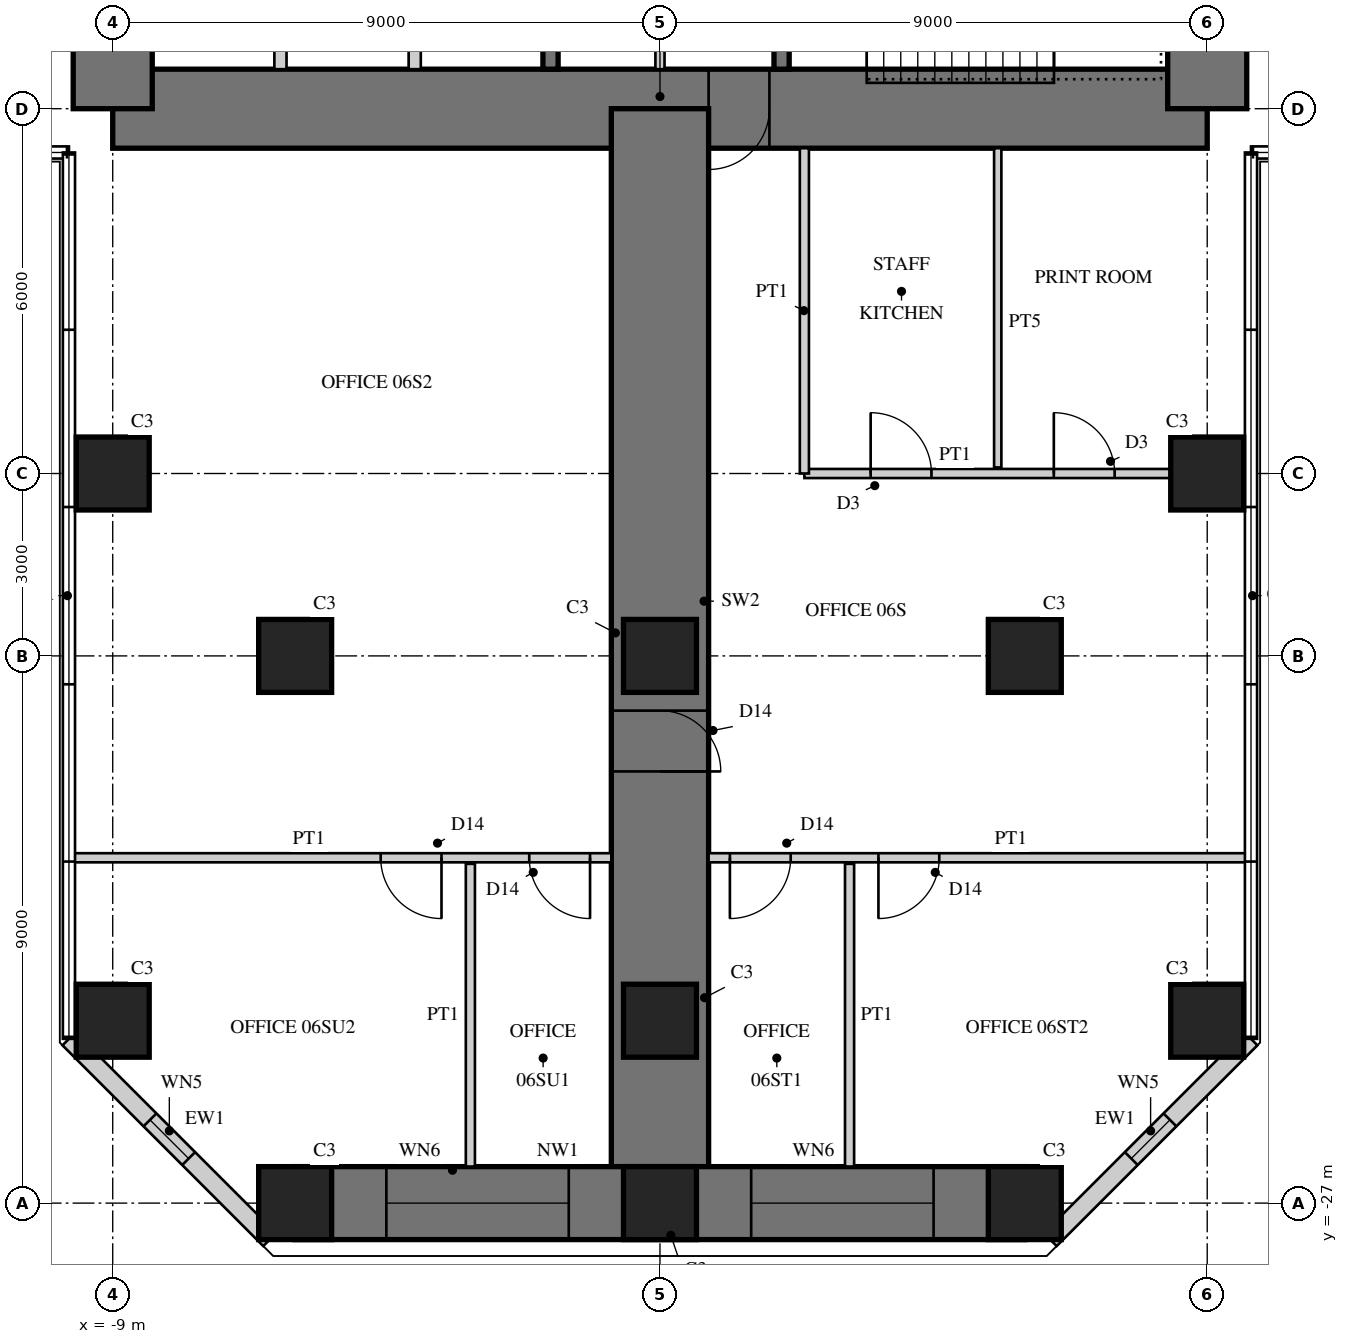
"""IFC4 building model, lengths in metres.
Left out: names, types, materials, properties, quantities, classifications, styles, units other than length and angle.
Written with IfcOpenShell. Run it as: python <this file> out.ifc"""

import sys

from ifc_helpers import new_model, si_unit, direction, frame, frame_2d, origin, origin_2d, place, context, subcontext, project, spatial, rectangle, hollow_rectangle, extrude, element, fill, save


model = new_model("IFC4")
c1 = context("Model", 3, precision=1e-05, world=origin(), true_north=direction((0.0, 1.0)))
c2 = subcontext(c1, "Body", "Model", "MODEL_VIEW")
j1 = project(units=[si_unit("LENGTHUNIT", "METRE"), si_unit("PLANEANGLEUNIT", "RADIAN")], contexts=[c1])
p1 = place(None, origin())
s1 = spatial("IfcSite", under=j1, at=p1, CompositionType="ELEMENT")
p2 = place(p1, origin())
s2 = spatial("IfcBuilding", under=s1, at=p2, CompositionType="ELEMENT")
p3 = place(p2, frame((0.0, 0.0, 27.5)))
s3 = spatial("IfcBuildingStorey", under=s2, at=p3, CompositionType="ELEMENT", Elevation=27.5)
p4 = place(p3, frame((-9.0, -9.0, 0.0), z_axis=(0.0, 0.0, 1.0), x_axis=(1.0, 0.0, 0.0)))
e1 = element("IfcWall", 1, at=p4, inside=s3, PredefinedType="SHEAR", context=c2, shape_type="SweptSolid", body=[
    extrude(rectangle(XDim=18.0, YDim=1.3, at=frame_2d((9.0, 0.0))), origin(), (0.0, 0.0, 1.0), 4.0),
])
p5 = place(p4, frame((9.8, 0.0, 0.0)))
e2 = element("IfcOpeningElement", 2, at=p5, cuts=e1, PredefinedType="OPENING", context=c2, shape_type="SweptSolid", body=[
    extrude(rectangle(XDim=1.0, YDim=2.4, at=frame_2d((0.5, 1.2))), frame((0.0, 0.66, 0.0), z_axis=(0.0, -1.0, 0.0), x_axis=(1.0, 0.0, 0.0)), (0.0, 0.0, 1.0), 1.32),
])
p6 = place(p3, frame((9.0, -9.0, 0.0), z_axis=(0.0, 0.0, 1.0), x_axis=(0.0, 1.0, 0.0)))
e3 = element("IfcWall", 3, at=p6, inside=s3, PredefinedType="SHEAR", context=c2, shape_type="SweptSolid", body=[
    extrude(rectangle(XDim=18.0, YDim=1.3, at=frame_2d((9.0, 0.0))), origin(), (0.0, 0.0, 1.0), 4.0),
])
p7 = place(p6, frame((9.8, 0.0, 0.0)))
e4 = element("IfcOpeningElement", 4, at=p7, cuts=e3, PredefinedType="OPENING", context=c2, shape_type="SweptSolid", body=[
    extrude(rectangle(XDim=1.0, YDim=2.4, at=frame_2d((0.5, 1.2))), frame((0.0, 0.66, 0.0), z_axis=(0.0, -1.0, 0.0), x_axis=(1.0, 0.0, 0.0)), (0.0, 0.0, 1.0), 1.32),
])
p8 = place(p3, frame((-9.0, 9.0, 0.0), z_axis=(0.0, 0.0, 1.0), x_axis=(0.0, -1.0, 0.0)))
e5 = element("IfcWall", 5, at=p8, inside=s3, PredefinedType="SHEAR", context=c2, shape_type="SweptSolid", body=[
    extrude(rectangle(XDim=18.0, YDim=1.3, at=frame_2d((9.0, 0.0))), origin(), (0.0, 0.0, 1.0), 4.0),
])
p9 = place(p8, frame((9.8, 0.0, 0.0)))
e6 = element("IfcOpeningElement", 6, at=p9, cuts=e5, PredefinedType="OPENING", context=c2, shape_type="SweptSolid", body=[
    extrude(rectangle(XDim=1.0, YDim=2.4, at=frame_2d((0.5, 1.2))), frame((0.0, 0.66, 0.0), z_axis=(0.0, -1.0, 0.0), x_axis=(1.0, 0.0, 0.0)), (0.0, 0.0, 1.0), 1.32),
])
p10 = place(p3, frame((-1.8, -1.875, 0.0), z_axis=(0.0, 0.0, 1.0), x_axis=(0.0, -1.0, 0.0)))
e7 = element("IfcWall", 7, at=p10, inside=s3, PredefinedType="SHEAR", context=c2, shape_type="SweptSolid", body=[
    extrude(rectangle(XDim=6.475, YDim=0.25, at=frame_2d((3.238, 0.0))), origin(), (0.0, 0.0, 1.0), 4.0),
])
p11 = place(p10, frame((1.875, 0.0, 0.0)))
e8 = element("IfcOpeningElement", 8, at=p11, cuts=e7, PredefinedType="OPENING", context=c2, shape_type="SweptSolid", body=[
    extrude(rectangle(XDim=1.6, YDim=2.4, at=frame_2d((0.8, 1.2))), frame((0.0, 0.135, 0.0), z_axis=(0.0, -1.0, 0.0), x_axis=(1.0, 0.0, 0.0)), (0.0, 0.0, 1.0), 0.27),
])
for number, where, z_axis, x_axis in (
    (9, (-4.033, -5.975, 0.0), (0.0, 0.0, 1.0), (0.0, -1.0, 0.0)),
    (10, (-6.242, -5.975, 0.0), (0.0, 0.0, 1.0), (0.0, -1.0, 0.0)),
):
    element("IfcWall", number, at=place(p3, frame(where, z_axis=z_axis, x_axis=x_axis)), inside=s3, PredefinedType="PARTITIONING", context=c2, shape_type="SweptSolid", body=[
        extrude(rectangle(XDim=2.375, YDim=0.2, at=frame_2d((1.188, 0.0))), origin(), (0.0, 0.0, 1.0), 4.0),
    ])
p12 = place(p3, frame((2.0, -1.675, 0.0), z_axis=(0.0, 0.0, 1.0), x_axis=(0.0, -1.0, 0.0)))
e11 = element("IfcWall", 11, at=p12, inside=s3, PredefinedType="SHEAR", context=c2, shape_type="SweptSolid", body=[
    extrude(rectangle(XDim=6.675, YDim=0.25, at=frame_2d((3.337, 0.0))), origin(), (0.0, 0.0, 1.0), 4.0),
])
p13 = place(p12, frame((0.725, 0.0, 0.0)))
e12 = element("IfcOpeningElement", 12, at=p13, cuts=e11, PredefinedType="OPENING", context=c2, shape_type="SweptSolid", body=[
    extrude(rectangle(XDim=1.0, YDim=2.1, at=frame_2d((0.5, 1.05))), frame((0.0, 0.135, 0.0), z_axis=(0.0, -1.0, 0.0), x_axis=(1.0, 0.0, 0.0)), (0.0, 0.0, 1.0), 0.27),
])
p14 = place(p3, frame((0.0, -9.0, 0.0), z_axis=(0.0, 0.0, 1.0), x_axis=(0.0, -1.0, 0.0)))
e13 = element("IfcWall", 13, at=p14, inside=s3, PredefinedType="SHEAR", context=c2, shape_type="SweptSolid", body=[
    extrude(rectangle(XDim=18.0, YDim=1.6, at=frame_2d((9.0, 0.0))), origin(), (0.0, 0.0, 1.0), 4.0),
])
p15 = place(p14, frame((9.9, 0.0, 0.0)))
e14 = element("IfcOpeningElement", 14, at=p15, cuts=e13, PredefinedType="OPENING", context=c2, shape_type="SweptSolid", body=[
    extrude(rectangle(XDim=1.0, YDim=2.2, at=frame_2d((0.5, 1.1))), frame((0.0, 0.81, 0.0), z_axis=(0.0, -1.0, 0.0), x_axis=(1.0, 0.0, 0.0)), (0.0, 0.0, 1.0), 1.62),
])
p16 = place(p3, frame((-6.0, -27.0, 0.0), z_axis=(0.0, 0.0, 1.0), x_axis=(1.0, 0.0, 0.0)))
e15 = element("IfcWall", 15, at=p16, inside=s3, PredefinedType="SHEAR", context=c2, shape_type="SweptSolid", body=[
    extrude(rectangle(XDim=12.0, YDim=1.2, at=frame_2d((6.0, 0.0))), origin(), (0.0, 0.0, 1.0), 4.0),
])
p17 = place(p16, frame((1.5, 0.0, 0.6)))
e16 = element("IfcOpeningElement", 16, at=p17, cuts=e15, PredefinedType="OPENING", context=c2, shape_type="SweptSolid", body=[
    extrude(rectangle(XDim=3.0, YDim=2.4, at=frame_2d((1.5, 1.2))), frame((0.0, 0.61, 0.0), z_axis=(0.0, -1.0, 0.0), x_axis=(1.0, 0.0, 0.0)), (0.0, 0.0, 1.0), 1.22),
])
p18 = place(p16, frame((7.5, 0.0, 0.6)))
e17 = element("IfcOpeningElement", 17, at=p18, cuts=e15, PredefinedType="OPENING", context=c2, shape_type="SweptSolid", body=[
    extrude(rectangle(XDim=3.0, YDim=2.4, at=frame_2d((1.5, 1.2))), frame((0.0, 0.61, 0.0), z_axis=(0.0, -1.0, 0.0), x_axis=(1.0, 0.0, 0.0)), (0.0, 0.0, 1.0), 1.22),
])
for number, where, z_axis, x_axis in (
    (18, (-9.0, -15.0, 0.0), (0.0, 0.0, 1.0), (1.0, 0.0, 0.0)),
    (19, (-9.0, -24.0, 0.0), (0.0, 0.0, 1.0), (1.0, 0.0, 0.0)),
    (20, (9.0, -15.0, 0.0), (0.0, 0.0, 1.0), (1.0, 0.0, 0.0)),
    (21, (9.0, -24.0, 0.0), (0.0, 0.0, 1.0), (1.0, 0.0, 0.0)),
    (22, (-6.0, -27.0, 0.0), (0.0, 0.0, 1.0), (1.0, 0.0, 0.0)),
    (23, (0.0, -27.0, 0.0), (0.0, 0.0, 1.0), (1.0, 0.0, 0.0)),
    (24, (6.0, -27.0, 0.0), (0.0, 0.0, 1.0), (1.0, 0.0, 0.0)),
    (25, (-6.0, -18.0, 0.0), (0.0, 0.0, 1.0), (1.0, 0.0, 0.0)),
    (26, (0.0, -18.0, 0.0), (0.0, 0.0, 1.0), (1.0, 0.0, 0.0)),
    (27, (6.0, -18.0, 0.0), (0.0, 0.0, 1.0), (1.0, 0.0, 0.0)),
    (28, (0.0, -24.0, 0.0), (0.0, 0.0, 1.0), (1.0, 0.0, 0.0)),
):
    element("IfcColumn", number, at=place(p3, frame(where, z_axis=z_axis, x_axis=x_axis)), inside=s3, PredefinedType="COLUMN", context=c2, shape_type="SweptSolid", body=[
        extrude(rectangle(XDim=1.2, YDim=1.2, at=origin_2d()), origin(), (0.0, 0.0, 1.0), 4.0),
    ])
p19 = place(p3, frame((-9.72, -24.298, 0.0), z_axis=(0.0, 0.0, 1.0), x_axis=(0.707106781187, -0.707106781187, 0.0)))
e29 = element("IfcWall", 29, at=p19, inside=s3, PredefinedType="SOLIDWALL", context=c2, shape_type="SweptSolid", body=[
    extrude(rectangle(XDim=4.669, YDim=0.3, at=frame_2d((2.335, 0.0))), origin(), (0.0, 0.0, 1.0), 3.8),
])
p20 = place(p19, frame((1.885, 0.0, 0.3)))
e30 = element("IfcOpeningElement", 30, at=p20, cuts=e29, PredefinedType="OPENING", context=c2, shape_type="SweptSolid", body=[
    extrude(rectangle(XDim=0.9, YDim=2.4, at=frame_2d((0.45, 1.2))), frame((0.0, 0.16, 0.0), z_axis=(0.0, -1.0, 0.0), x_axis=(1.0, 0.0, 0.0)), (0.0, 0.0, 1.0), 0.32),
])
p21 = place(p3, frame((6.418, -27.6, 0.0), z_axis=(0.0, 0.0, 1.0), x_axis=(0.707106781187, 0.707106781187, 0.0)))
e31 = element("IfcWall", 31, at=p21, inside=s3, PredefinedType="SOLIDWALL", context=c2, shape_type="SweptSolid", body=[
    extrude(rectangle(XDim=4.669, YDim=0.3, at=frame_2d((2.335, 0.0))), origin(), (0.0, 0.0, 1.0), 3.8),
])
p22 = place(p21, frame((1.885, 0.0, 0.3)))
e32 = element("IfcOpeningElement", 32, at=p22, cuts=e31, PredefinedType="OPENING", context=c2, shape_type="SweptSolid", body=[
    extrude(rectangle(XDim=0.9, YDim=2.4, at=frame_2d((0.45, 1.2))), frame((0.0, 0.16, 0.0), z_axis=(0.0, -1.0, 0.0), x_axis=(1.0, 0.0, 0.0)), (0.0, 0.0, 1.0), 0.32),
])
p23 = place(p3, frame((0.0, -5.675, 0.0), z_axis=(0.0, 0.0, 1.0), x_axis=(0.0, -1.0, 0.0)))
e33 = element("IfcWall", 33, at=p23, inside=s3, PredefinedType="PARTITIONING", context=c2, shape_type="SweptSolid", body=[
    extrude(rectangle(XDim=2.675, YDim=0.15, at=frame_2d((1.337, 0.0))), origin(), (0.0, 0.0, 1.0), 3.8),
])
p24 = place(p23, frame((0.4, 0.0, 0.0)))
e34 = element("IfcOpeningElement", 34, at=p24, cuts=e33, PredefinedType="OPENING", context=c2, shape_type="SweptSolid", body=[
    extrude(rectangle(XDim=1.0, YDim=2.1, at=frame_2d((0.5, 1.05))), frame((0.0, 0.085, 0.0), z_axis=(0.0, -1.0, 0.0), x_axis=(1.0, 0.0, 0.0)), (0.0, 0.0, 1.0), 0.17),
])
p25 = place(p3, frame((2.375, -15.0, 0.0), z_axis=(0.0, 0.0, 1.0), x_axis=(1.0, 0.0, 0.0)))
e35 = element("IfcWall", 35, at=p25, inside=s3, PredefinedType="PARTITIONING", context=c2, shape_type="SweptSolid", body=[
    extrude(rectangle(XDim=6.025, YDim=0.15, at=frame_2d((3.012, 0.0))), origin(), (0.0, 0.0, 1.0), 2.95),
])
p26 = place(p25, frame((1.09, 0.0, 0.0)))
e36 = element("IfcOpeningElement", 36, at=p26, cuts=e35, PredefinedType="OPENING", context=c2, shape_type="SweptSolid", body=[
    extrude(rectangle(XDim=1.0, YDim=2.1, at=frame_2d((0.5, 1.05))), frame((0.0, 0.085, 0.0), z_axis=(0.0, -1.0, 0.0), x_axis=(1.0, 0.0, 0.0)), (0.0, 0.0, 1.0), 0.17),
])
p27 = place(p25, frame((4.102, 0.0, 0.0)))
e37 = element("IfcOpeningElement", 37, at=p27, cuts=e35, PredefinedType="OPENING", context=c2, shape_type="SweptSolid", body=[
    extrude(rectangle(XDim=1.0, YDim=2.1, at=frame_2d((0.5, 1.05))), frame((0.0, 0.085, 0.0), z_axis=(0.0, -1.0, 0.0), x_axis=(1.0, 0.0, 0.0)), (0.0, 0.0, 1.0), 0.17),
])
p28 = place(p3, frame((2.375, -9.65, 0.0), z_axis=(0.0, 0.0, 1.0), x_axis=(0.0, -1.0, 0.0)))
e38 = element("IfcWall", 38, at=p28, inside=s3, PredefinedType="PARTITIONING", context=c2, shape_type="SweptSolid", body=[
    extrude(rectangle(XDim=5.35, YDim=0.15, at=frame_2d((2.675, 0.0))), origin(), (0.0, 0.0, 1.0), 3.8),
])
p29 = place(p3, frame((5.555, -9.65, 0.0), z_axis=(0.0, 0.0, 1.0), x_axis=(0.0, -1.0, 0.0)))
e39 = element("IfcWall", 39, at=p29, inside=s3, PredefinedType="PLUMBINGWALL", context=c2, shape_type="SweptSolid", body=[
    extrude(rectangle(XDim=5.25, YDim=0.12, at=frame_2d((2.625, 0.0))), origin(), (0.0, 0.0, 1.0), 3.8),
])
p30 = place(p3, frame((3.118, -21.42, 0.0), z_axis=(0.0, 0.0, 1.0), x_axis=(0.0, -1.0, 0.0)))
e40 = element("IfcWall", 40, at=p30, inside=s3, PredefinedType="PARTITIONING", context=c2, shape_type="SweptSolid", body=[
    extrude(rectangle(XDim=4.98, YDim=0.15, at=frame_2d((2.49, 0.0))), origin(), (0.0, 0.0, 1.0), 3.8),
])
p31 = place(p3, frame((0.8, -21.32, 0.0), z_axis=(0.0, 0.0, 1.0), x_axis=(1.0, 0.0, 0.0)))
e41 = element("IfcWall", 41, at=p31, inside=s3, PredefinedType="PARTITIONING", context=c2, shape_type="SweptSolid", body=[
    extrude(rectangle(XDim=8.88, YDim=0.15, at=frame_2d((4.44, 0.0))), origin(), (0.0, 0.0, 1.0), 3.8),
])
p32 = place(p31, frame((0.35, 0.0, 0.0)))
e42 = element("IfcOpeningElement", 42, at=p32, cuts=e41, PredefinedType="OPENING", context=c2, shape_type="SweptSolid", body=[
    extrude(rectangle(XDim=1.0, YDim=2.2, at=frame_2d((0.5, 1.1))), frame((0.0, 0.085, 0.0), z_axis=(0.0, -1.0, 0.0), x_axis=(1.0, 0.0, 0.0)), (0.0, 0.0, 1.0), 0.17),
])
p33 = place(p31, frame((2.793, 0.0, 0.0)))
e43 = element("IfcOpeningElement", 43, at=p33, cuts=e41, PredefinedType="OPENING", context=c2, shape_type="SweptSolid", body=[
    extrude(rectangle(XDim=1.0, YDim=2.2, at=frame_2d((0.5, 1.1))), frame((0.0, 0.085, 0.0), z_axis=(0.0, -1.0, 0.0), x_axis=(1.0, 0.0, 0.0)), (0.0, 0.0, 1.0), 0.17),
])
p34 = place(p3, frame((-3.118, -21.42, 0.0), z_axis=(0.0, 0.0, 1.0), x_axis=(0.0, -1.0, 0.0)))
e44 = element("IfcWall", 44, at=p34, inside=s3, PredefinedType="PARTITIONING", context=c2, shape_type="SweptSolid", body=[
    extrude(rectangle(XDim=4.98, YDim=0.15, at=frame_2d((2.49, 0.0))), origin(), (0.0, 0.0, 1.0), 3.8),
])
p35 = place(p3, frame((-9.68, -21.32, 0.0), z_axis=(0.0, 0.0, 1.0), x_axis=(1.0, 0.0, 0.0)))
e45 = element("IfcWall", 45, at=p35, inside=s3, PredefinedType="PARTITIONING", context=c2, shape_type="SweptSolid", body=[
    extrude(rectangle(XDim=8.88, YDim=0.15, at=frame_2d((4.44, 0.0))), origin(), (0.0, 0.0, 1.0), 3.8),
])
p36 = place(p35, frame((5.087, 0.0, 0.0)))
e46 = element("IfcOpeningElement", 46, at=p36, cuts=e45, PredefinedType="OPENING", context=c2, shape_type="SweptSolid", body=[
    extrude(rectangle(XDim=1.0, YDim=2.2, at=frame_2d((0.5, 1.1))), frame((0.0, 0.085, 0.0), z_axis=(0.0, -1.0, 0.0), x_axis=(1.0, 0.0, 0.0)), (0.0, 0.0, 1.0), 0.17),
])
p37 = place(p35, frame((7.53, 0.0, 0.0)))
e47 = element("IfcOpeningElement", 47, at=p37, cuts=e45, PredefinedType="OPENING", context=c2, shape_type="SweptSolid", body=[
    extrude(rectangle(XDim=1.0, YDim=2.2, at=frame_2d((0.5, 1.1))), frame((0.0, 0.085, 0.0), z_axis=(0.0, -1.0, 0.0), x_axis=(1.0, 0.0, 0.0)), (0.0, 0.0, 1.0), 0.17),
])
p38 = place(p20, origin())
e48 = element("IfcWindow", 48, at=p38, inside=s3, PartitioningType="SINGLE_PANEL", PredefinedType="WINDOW", context=c2, shape_type="SweptSolid", body=[
    extrude(hollow_rectangle(XDim=0.9, YDim=2.4, WallThickness=0.06, at=frame_2d((0.45, 1.2))), frame((0.0, 0.03, 0.0), z_axis=(0.0, -1.0, 0.0), x_axis=(1.0, 0.0, 0.0)), (0.0, 0.0, 1.0), 0.06),
    extrude(rectangle(XDim=0.779, YDim=2.279, at=frame_2d((0.45, 1.2))), frame((0.0, 0.03, 0.0), z_axis=(0.0, -1.0, 0.0), x_axis=(1.0, 0.0, 0.0)), (0.0, 0.0, 1.0), 0.06),
])
fill(e30, e48)
p39 = place(p17, origin())
e49 = element("IfcWindow", 49, at=p39, inside=s3, PartitioningType="SINGLE_PANEL", PredefinedType="WINDOW", context=c2, shape_type="SweptSolid", body=[
    extrude(hollow_rectangle(XDim=3.0, YDim=2.4, WallThickness=0.06, at=frame_2d((1.5, 1.2))), frame((0.0, 0.03, 0.0), z_axis=(0.0, -1.0, 0.0), x_axis=(1.0, 0.0, 0.0)), (0.0, 0.0, 1.0), 0.06),
    extrude(rectangle(XDim=2.879, YDim=2.279, at=frame_2d((1.5, 1.2))), frame((0.0, 0.03, 0.0), z_axis=(0.0, -1.0, 0.0), x_axis=(1.0, 0.0, 0.0)), (0.0, 0.0, 1.0), 0.06),
])
fill(e16, e49)
p40 = place(p18, origin())
e50 = element("IfcWindow", 50, at=p40, inside=s3, PartitioningType="SINGLE_PANEL", PredefinedType="WINDOW", context=c2, shape_type="SweptSolid", body=[
    extrude(hollow_rectangle(XDim=3.0, YDim=2.4, WallThickness=0.06, at=frame_2d((1.5, 1.2))), frame((0.0, 0.03, 0.0), z_axis=(0.0, -1.0, 0.0), x_axis=(1.0, 0.0, 0.0)), (0.0, 0.0, 1.0), 0.06),
    extrude(rectangle(XDim=2.879, YDim=2.279, at=frame_2d((1.5, 1.2))), frame((0.0, 0.03, 0.0), z_axis=(0.0, -1.0, 0.0), x_axis=(1.0, 0.0, 0.0)), (0.0, 0.0, 1.0), 0.06),
])
fill(e17, e50)
p41 = place(p22, origin())
e51 = element("IfcWindow", 51, at=p41, inside=s3, PartitioningType="SINGLE_PANEL", PredefinedType="WINDOW", context=c2, shape_type="SweptSolid", body=[
    extrude(hollow_rectangle(XDim=0.9, YDim=2.4, WallThickness=0.06, at=frame_2d((0.45, 1.2))), frame((0.0, 0.03, 0.0), z_axis=(0.0, -1.0, 0.0), x_axis=(1.0, 0.0, 0.0)), (0.0, 0.0, 1.0), 0.06),
    extrude(rectangle(XDim=0.779, YDim=2.279, at=frame_2d((0.45, 1.2))), frame((0.0, 0.03, 0.0), z_axis=(0.0, -1.0, 0.0), x_axis=(1.0, 0.0, 0.0)), (0.0, 0.0, 1.0), 0.06),
])
fill(e32, e51)
p42 = place(p26, origin())
e52 = element("IfcDoor", 52, at=p42, inside=s3, OperationType="SINGLE_SWING_LEFT", PredefinedType="DOOR", context=c2, shape_type="SweptSolid", body=[
    extrude(rectangle(XDim=1.0, YDim=2.1, at=frame_2d((0.5, 1.05))), frame((0.0, 0.025, 0.0), z_axis=(0.0, -1.0, 0.0), x_axis=(1.0, 0.0, 0.0)), (0.0, 0.0, 1.0), 0.05),
])
fill(e36, e52)
p43 = place(p27, origin())
e53 = element("IfcDoor", 53, at=p43, inside=s3, OperationType="SINGLE_SWING_LEFT", PredefinedType="DOOR", context=c2, shape_type="SweptSolid", body=[
    extrude(rectangle(XDim=1.0, YDim=2.1, at=frame_2d((0.5, 1.05))), frame((0.0, 0.025, 0.0), z_axis=(0.0, -1.0, 0.0), x_axis=(1.0, 0.0, 0.0)), (0.0, 0.0, 1.0), 0.05),
])
fill(e37, e53)
p44 = place(p32, frame((1.0, 0.0, 0.0), z_axis=(0.0, 0.0, 1.0), x_axis=(-1.0, 0.0, 0.0)))
e54 = element("IfcDoor", 54, at=p44, inside=s3, OperationType="SINGLE_SWING_RIGHT", PredefinedType="DOOR", context=c2, shape_type="SweptSolid", body=[
    extrude(rectangle(XDim=1.0, YDim=2.2, at=frame_2d((0.5, 1.1))), frame((0.0, 0.025, 0.0), z_axis=(0.0, -1.0, 0.0), x_axis=(1.0, 0.0, 0.0)), (0.0, 0.0, 1.0), 0.05),
])
fill(e42, e54)
p45 = place(p33, frame((1.0, 0.0, 0.0), z_axis=(0.0, 0.0, 1.0), x_axis=(-1.0, 0.0, 0.0)))
e55 = element("IfcDoor", 55, at=p45, inside=s3, OperationType="SINGLE_SWING_RIGHT", PredefinedType="DOOR", context=c2, shape_type="SweptSolid", body=[
    extrude(rectangle(XDim=1.0, YDim=2.2, at=frame_2d((0.5, 1.1))), frame((0.0, 0.025, 0.0), z_axis=(0.0, -1.0, 0.0), x_axis=(1.0, 0.0, 0.0)), (0.0, 0.0, 1.0), 0.05),
])
fill(e43, e55)
p46 = place(p36, frame((1.0, 0.0, 0.0), z_axis=(0.0, 0.0, 1.0), x_axis=(-1.0, 0.0, 0.0)))
e56 = element("IfcDoor", 56, at=p46, inside=s3, OperationType="SINGLE_SWING_LEFT", PredefinedType="DOOR", context=c2, shape_type="SweptSolid", body=[
    extrude(rectangle(XDim=1.0, YDim=2.2, at=frame_2d((0.5, 1.1))), frame((0.0, 0.025, 0.0), z_axis=(0.0, -1.0, 0.0), x_axis=(1.0, 0.0, 0.0)), (0.0, 0.0, 1.0), 0.05),
])
fill(e46, e56)
p47 = place(p37, frame((1.0, 0.0, 0.0), z_axis=(0.0, 0.0, 1.0), x_axis=(-1.0, 0.0, 0.0)))
e57 = element("IfcDoor", 57, at=p47, inside=s3, OperationType="SINGLE_SWING_LEFT", PredefinedType="DOOR", context=c2, shape_type="SweptSolid", body=[
    extrude(rectangle(XDim=1.0, YDim=2.2, at=frame_2d((0.5, 1.1))), frame((0.0, 0.025, 0.0), z_axis=(0.0, -1.0, 0.0), x_axis=(1.0, 0.0, 0.0)), (0.0, 0.0, 1.0), 0.05),
])
fill(e47, e57)
p48 = place(p15, origin())
e58 = element("IfcDoor", 58, at=p48, inside=s3, OperationType="SINGLE_SWING_RIGHT", PredefinedType="DOOR", context=c2, shape_type="SweptSolid", body=[
    extrude(rectangle(XDim=1.0, YDim=2.2, at=frame_2d((0.5, 1.1))), frame((0.0, 0.025, 0.0), z_axis=(0.0, -1.0, 0.0), x_axis=(1.0, 0.0, 0.0)), (0.0, 0.0, 1.0), 0.05),
])
fill(e14, e58)
p49 = place(p5, frame((1.0, 0.0, 0.0), z_axis=(0.0, 0.0, 1.0), x_axis=(-1.0, 0.0, 0.0)))
e59 = element("IfcDoor", 59, at=p49, inside=s3, OperationType="SINGLE_SWING_RIGHT", PredefinedType="DOOR", context=c2, shape_type="SweptSolid", body=[
    extrude(rectangle(XDim=1.0, YDim=2.4, at=frame_2d((0.5, 1.2))), frame((0.0, -0.005, 0.0), z_axis=(0.0, -1.0, 0.0), x_axis=(1.0, 0.0, 0.0)), (0.0, 0.0, 1.0), 0.05),
])
fill(e2, e59)
save(model, sys.argv[1])
